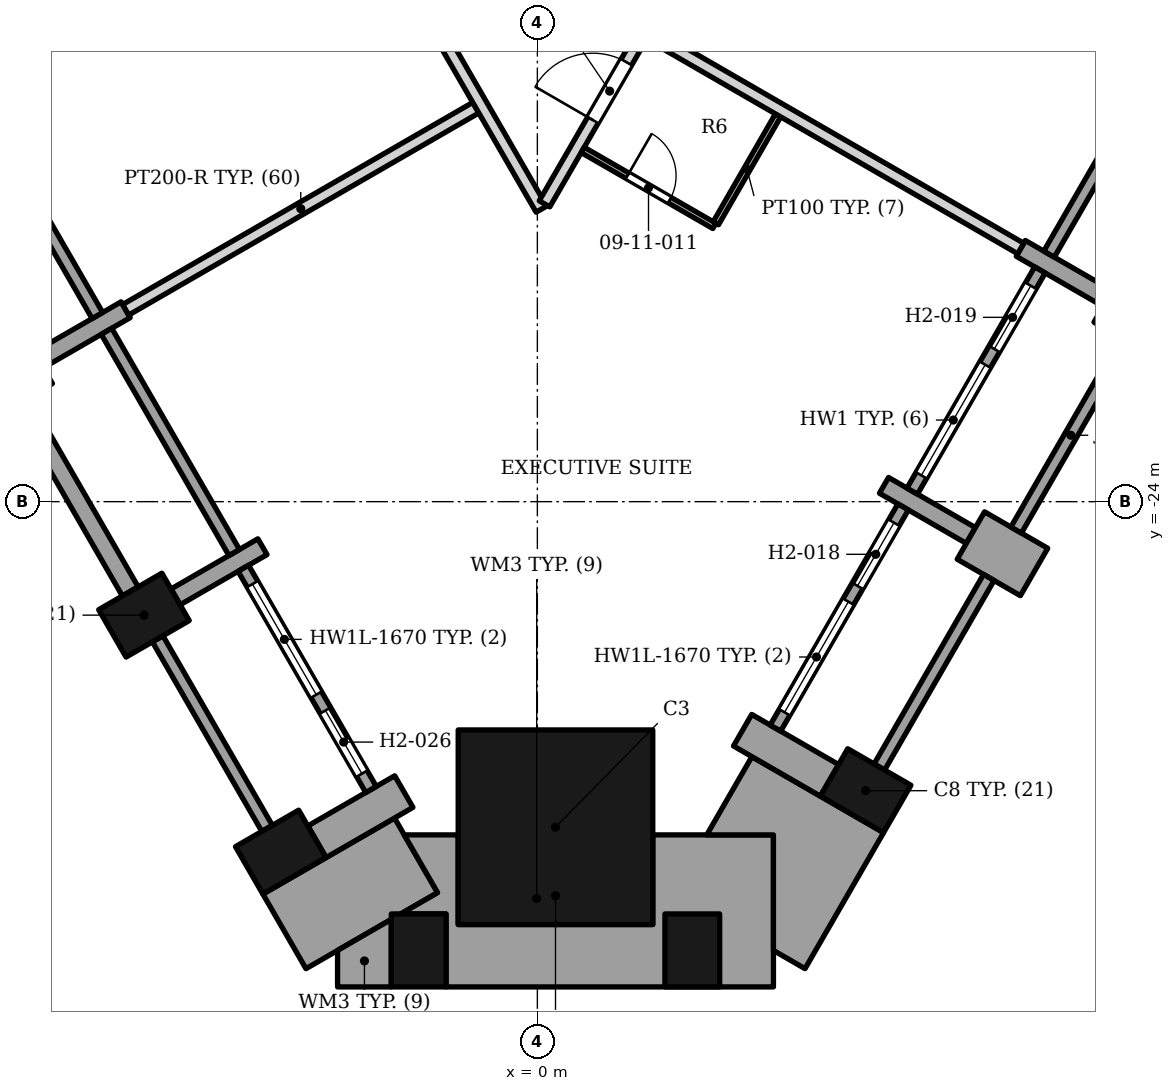
"""IFC4 building model, lengths in metres.
Left out: names, types, materials, properties, quantities, classifications, styles, units other than length and angle.
Written with IfcOpenShell. Run it as: python <this file> out.ifc"""

import sys

from ifc_helpers import new_model, si_unit, direction, frame, frame_2d, origin, origin_2d, place, context, subcontext, project, spatial, polyline, rectangle, outline, extrude, element, fill, save


model = new_model("IFC4")
c1 = context("Model", 3, precision=1e-05, world=origin(), true_north=direction((0.0, 1.0)))
c2 = subcontext(c1, "Body", "Model", "MODEL_VIEW")
j1 = project(units=[si_unit("LENGTHUNIT", "METRE"), si_unit("PLANEANGLEUNIT", "RADIAN")], contexts=[c1])
p1 = place(None, origin())
s1 = spatial("IfcSite", under=j1, at=p1, CompositionType="ELEMENT")
p2 = place(p1, origin())
s2 = spatial("IfcBuilding", under=s1, at=p2, CompositionType="ELEMENT")
p3 = place(p2, frame((0.0, 0.0, 56.2)))
s3 = spatial("IfcBuildingStorey", under=s2, at=p3, CompositionType="ELEMENT", Elevation=56.2)
p4 = place(p3, frame((0.298, -29.354, 0.0), z_axis=(0.0, 0.0, 1.0), x_axis=(0.0, 1.0, 0.0)))
e1 = element("IfcColumn", 1, at=p4, inside=s3, PredefinedType="COLUMN", context=c2, shape_type="SweptSolid", body=[
    extrude(rectangle(XDim=3.2, YDim=3.2, at=origin_2d()), origin(), (0.0, 0.0, 1.0), 3.4),
])
for number, where, z_axis, x_axis in (
    (2, (-6.47, -25.866, 0.0), (0.0, 0.0, 1.0), (0.5, -0.866, 0.0)),
    (3, (-4.22, -29.763, 0.0), (0.0, 0.0, 1.0), (0.5, -0.866, 0.0)),
    (4, (-1.952, -31.38, 0.0), (0.0, 0.0, 1.0), (1.0, 0.0, 0.0)),
    (5, (2.548, -31.38, 0.0), (0.0, 0.0, 1.0), (1.0, 0.0, 0.0)),
    (6, (5.399, -28.753, 0.0), (0.0, 0.0, 1.0), (0.5, 0.866, 0.0)),
    (7, (9.899, -20.959, 0.0), (0.0, 0.0, 1.0), (0.5, 0.866, 0.0)),
):
    element("IfcColumn", number, at=place(p3, frame(where, z_axis=z_axis, x_axis=x_axis)), inside=s3, PredefinedType="COLUMN", context=c2, shape_type="SweptSolid", body=[
        extrude(rectangle(XDim=0.9, YDim=1.2, at=origin_2d()), origin(), (0.0, 0.0, 1.0), 3.4),
    ])
p5 = place(p3, frame((-8.2, -21.669, 0.0), z_axis=(0.0, 0.0, 1.0), x_axis=(-0.865955154139, -0.50012165622, 0.0)))
e8 = element("IfcWall", 8, at=p5, inside=s3, PredefinedType="SOLIDWALL", context=c2, shape_type="SweptSolid", body=[
    extrude(rectangle(XDim=1.2, YDim=0.9, at=frame_2d((0.6, 0.0))), origin(), (0.0, 0.0, 1.0), 2.63),
])
p6 = place(p3, frame((-6.771, -20.844, 0.0), z_axis=(0.0, 0.0, 1.0), x_axis=(-0.866040211805, -0.499974350878, 0.0)))
e9 = element("IfcWall", 9, at=p6, inside=s3, PredefinedType="SOLIDWALL", context=c2, shape_type="SweptSolid", body=[
    extrude(rectangle(XDim=1.65, YDim=0.3, at=frame_2d((0.825, 0.0))), origin(), (0.0, 0.0, 1.0), 2.65),
])
p7 = place(p3, frame((-4.521, -24.741, 0.0), z_axis=(0.0, 0.0, 1.0), x_axis=(-0.865976140824, -0.500085316245, 0.0)))
e10 = element("IfcWall", 10, at=p7, inside=s3, PredefinedType="SOLIDWALL", context=c2, shape_type="SweptSolid", body=[
    extrude(rectangle(XDim=1.65, YDim=0.3, at=frame_2d((0.825, 0.0))), origin(), (0.0, 0.0, 1.0), 2.552),
])
p8 = place(p3, frame((-3.625, -29.593, 0.0), z_axis=(0.0, 0.0, 1.0), x_axis=(0.866040211805, 0.499974350878, 0.0)))
e11 = element("IfcWall", 11, at=p8, inside=s3, PredefinedType="SOLIDWALL", context=c2, shape_type="SweptSolid", body=[
    extrude(rectangle(XDim=1.65, YDim=0.6, at=frame_2d((0.825, 0.0))), origin(), (0.0, 0.0, 1.0), 2.63),
])
p9 = place(p3, frame((-9.336, -17.302, 0.0), z_axis=(0.0, 0.0, 1.0), x_axis=(0.500027713859, -0.866009402589, 0.0)))
e12 = element("IfcWall", 12, at=p9, inside=s3, PredefinedType="ELEMENTEDWALL", context=c2, shape_type="SweptSolid", body=[
    extrude(rectangle(XDim=4.2, YDim=0.2, at=frame_2d((2.1, 0.0))), origin(), (0.0, 0.0, 1.0), 2.65),
])
p10 = place(p3, frame((-8.495, -22.358, 0.0), z_axis=(0.0, 0.0, 1.0), x_axis=(0.499961193289, -0.866047807691, 0.0)))
e13 = element("IfcWall", 13, at=p10, inside=s3, PredefinedType="SOLIDWALL", context=c2, shape_type="SweptSolid", body=[
    extrude(rectangle(XDim=3.6, YDim=0.3, at=frame_2d((1.8, 0.0))), origin(), (0.0, 0.0, 1.0), 2.63),
])
p11 = place(p3, frame((-7.086, -21.199, 0.0), z_axis=(0.0, 0.0, 1.0), x_axis=(0.500027713859, -0.866009402589, 0.0)))
e14 = element("IfcWall", 14, at=p11, inside=s3, PredefinedType="ELEMENTEDWALL", context=c2, shape_type="SweptSolid", body=[
    extrude(rectangle(XDim=4.2, YDim=0.2, at=frame_2d((2.1, 0.0))), origin(), (0.0, 0.0, 1.0), 2.65),
])
p12 = place(p3, frame((-6.245, -26.256, 0.0), z_axis=(0.0, 0.0, 1.0), x_axis=(0.499961193289, -0.866047807691, 0.0)))
e15 = element("IfcWall", 15, at=p12, inside=s3, PredefinedType="SOLIDWALL", context=c2, shape_type="SweptSolid", body=[
    extrude(rectangle(XDim=3.6, YDim=0.2, at=frame_2d((1.8, 0.0))), origin(), (0.0, 0.0, 1.0), 2.63),
])
p13 = place(p3, frame((-4.836, -25.096, 0.0), z_axis=(0.0, 0.0, 1.0), x_axis=(0.500002543286, -0.866023935413, 0.0)))
e16 = element("IfcWall", 16, at=p13, inside=s3, PredefinedType="ELEMENTEDWALL", context=c2, shape_type="SweptSolid", body=[
    extrude(rectangle(XDim=4.2, YDim=0.2, at=frame_2d((2.1, 0.0))), origin(), (0.0, 0.0, 1.0), 2.374),
])
p14 = place(p13, frame((0.3, 0.0, 0.6)))
e17 = element("IfcOpeningElement", 17, at=p14, cuts=e16, PredefinedType="OPENING", context=c2, shape_type="SweptSolid", body=[
    extrude(rectangle(XDim=2.1, YDim=1.67, at=frame_2d((1.05, 0.835))), frame((0.0, 0.11, 0.0), z_axis=(0.0, -1.0, 0.0), x_axis=(1.0, 0.0, 0.0)), (0.0, 0.0, 1.0), 0.22),
])
p15 = place(p13, frame((2.7, 0.0, 0.0)))
e18 = element("IfcOpeningElement", 18, at=p15, cuts=e16, PredefinedType="OPENING", context=c2, shape_type="SweptSolid", body=[
    extrude(rectangle(XDim=1.2, YDim=2.27, at=frame_2d((0.6, 1.135))), frame((0.0, 0.11, 0.0), z_axis=(0.0, -1.0, 0.0), x_axis=(1.0, 0.0, 0.0)), (0.0, 0.0, 1.0), 0.22),
])
p16 = place(p3, frame((4.804, -28.583, 0.0), z_axis=(0.0, 0.0, 1.0), x_axis=(-0.865976140824, 0.500085316245, 0.0)))
e19 = element("IfcWall", 19, at=p16, inside=s3, PredefinedType="SOLIDWALL", context=c2, shape_type="SweptSolid", body=[
    extrude(rectangle(XDim=1.65, YDim=0.6, at=frame_2d((0.825, 0.0))), origin(), (0.0, 0.0, 1.0), 2.65),
])
p17 = place(p3, frame((8.169, -25.156, 0.0), z_axis=(0.0, 0.0, 1.0), x_axis=(-0.865955154139, 0.50012165622, 0.0)))
e20 = element("IfcWall", 20, at=p17, inside=s3, PredefinedType="SOLIDWALL", context=c2, shape_type="SweptSolid", body=[
    extrude(rectangle(XDim=1.2, YDim=0.9, at=frame_2d((0.6, 0.0))), origin(), (0.0, 0.0, 1.0), 2.63),
])
p18 = place(p3, frame((7.13, -24.556, 0.0), z_axis=(0.0, 0.0, 1.0), x_axis=(-0.866040211805, 0.499974350878, 0.0)))
e21 = element("IfcWall", 21, at=p18, inside=s3, PredefinedType="SOLIDWALL", context=c2, shape_type="SweptSolid", body=[
    extrude(rectangle(XDim=1.65, YDim=0.3, at=frame_2d((0.825, 0.0))), origin(), (0.0, 0.0, 1.0), 2.65),
])
p19 = place(p3, frame((9.379, -20.659, 0.0), z_axis=(0.0, 0.0, 1.0), x_axis=(-0.866003217194, 0.500038426333, 0.0)))
e22 = element("IfcWall", 22, at=p19, inside=s3, PredefinedType="SOLIDWALL", context=c2, shape_type="SweptSolid", body=[
    extrude(rectangle(XDim=1.65, YDim=0.3, at=frame_2d((0.825, 0.0))), origin(), (0.0, 0.0, 1.0), 2.65),
])
p20 = place(p3, frame((5.624, -28.364, 0.0), z_axis=(0.0, 0.0, 1.0), x_axis=(0.499961193289, 0.866047807691, 0.0)))
e23 = element("IfcWall", 23, at=p20, inside=s3, PredefinedType="SOLIDWALL", context=c2, shape_type="SweptSolid", body=[
    extrude(rectangle(XDim=3.6, YDim=0.2, at=frame_2d((1.8, 0.0))), origin(), (0.0, 0.0, 1.0), 2.374),
])
p21 = place(p3, frame((3.915, -27.724, 0.0), z_axis=(0.0, 0.0, 1.0), x_axis=(0.500002543286, 0.866023935413, 0.0)))
e24 = element("IfcWall", 24, at=p21, inside=s3, PredefinedType="ELEMENTEDWALL", context=c2, shape_type="SweptSolid", body=[
    extrude(rectangle(XDim=4.2, YDim=0.2, at=frame_2d((2.1, 0.0))), origin(), (0.0, 0.0, 1.0), 2.374),
])
p22 = place(p21, frame((0.3, 0.0, 0.6)))
e25 = element("IfcOpeningElement", 25, at=p22, cuts=e24, PredefinedType="OPENING", context=c2, shape_type="SweptSolid", body=[
    extrude(rectangle(XDim=2.1, YDim=1.67, at=frame_2d((1.05, 0.835))), frame((0.0, 0.11, 0.0), z_axis=(0.0, -1.0, 0.0), x_axis=(1.0, 0.0, 0.0)), (0.0, 0.0, 1.0), 0.22),
])
p23 = place(p21, frame((2.7, 0.0, 0.0)))
e26 = element("IfcOpeningElement", 26, at=p23, cuts=e24, PredefinedType="OPENING", context=c2, shape_type="SweptSolid", body=[
    extrude(rectangle(XDim=1.2, YDim=2.27, at=frame_2d((0.6, 1.135))), frame((0.0, 0.11, 0.0), z_axis=(0.0, -1.0, 0.0), x_axis=(1.0, 0.0, 0.0)), (0.0, 0.0, 1.0), 0.22),
])
p24 = place(p3, frame((7.874, -24.467, 0.0), z_axis=(0.0, 0.0, 1.0), x_axis=(0.499961193289, 0.866047807691, 0.0)))
e27 = element("IfcWall", 27, at=p24, inside=s3, PredefinedType="SOLIDWALL", context=c2, shape_type="SweptSolid", body=[
    extrude(rectangle(XDim=3.6, YDim=0.2, at=frame_2d((1.8, 0.0))), origin(), (0.0, 0.0, 1.0), 2.63),
])
p25 = place(p3, frame((6.165, -23.826, 0.0), z_axis=(0.0, 0.0, 1.0), x_axis=(0.500027713859, 0.866009402589, 0.0)))
e28 = element("IfcWall", 28, at=p25, inside=s3, PredefinedType="ELEMENTEDWALL", context=c2, shape_type="SweptSolid", body=[
    extrude(rectangle(XDim=4.2, YDim=0.2, at=frame_2d((2.1, 0.0))), origin(), (0.0, 0.0, 1.0), 2.65),
])
p26 = place(p25, frame((0.3, 0.0, 0.6)))
e29 = element("IfcOpeningElement", 29, at=p26, cuts=e28, PredefinedType="OPENING", context=c2, shape_type="SweptSolid", body=[
    extrude(rectangle(XDim=2.1, YDim=1.8, at=frame_2d((1.05, 0.9))), frame((0.0, 0.11, 0.0), z_axis=(0.0, -1.0, 0.0), x_axis=(1.0, 0.0, 0.0)), (0.0, 0.0, 1.0), 0.22),
])
p27 = place(p25, frame((2.7, 0.0, 0.0)))
e30 = element("IfcOpeningElement", 30, at=p27, cuts=e28, PredefinedType="OPENING", context=c2, shape_type="SweptSolid", body=[
    extrude(rectangle(XDim=1.2, YDim=2.4, at=frame_2d((0.6, 1.2))), frame((0.0, 0.11, 0.0), z_axis=(0.0, -1.0, 0.0), x_axis=(1.0, 0.0, 0.0)), (0.0, 0.0, 1.0), 0.22),
])
p28 = place(p3, frame((8.415, -19.929, 0.0), z_axis=(0.0, 0.0, 1.0), x_axis=(0.500002543286, 0.866023935413, 0.0)))
e31 = element("IfcWall", 31, at=p28, inside=s3, PredefinedType="ELEMENTEDWALL", context=c2, shape_type="SweptSolid", body=[
    extrude(rectangle(XDim=4.2, YDim=0.2, at=frame_2d((2.1, 0.0))), origin(), (0.0, 0.0, 1.0), 2.65),
])
p29 = place(p3, frame((-1.995, -29.816, 0.0), z_axis=(0.0, 0.0, 1.0), x_axis=(-0.866022959057, -0.500004234368, 0.0)))
e32 = element("IfcWall", 32, at=p29, inside=s3, PredefinedType="SOLIDWALL", context=c2, shape_type="SweptSolid", body=[
    extrude(rectangle(XDim=2.5, YDim=1.417, at=frame_2d((1.25, 0.0))), origin(), (0.0, 0.0, 1.0), 2.63),
])
p30 = place(p3, origin())
e33 = element("IfcWall", 33, at=p30, inside=s3, PredefinedType="SOLIDWALL", context=c2, shape_type="SweptSolid", body=[
    extrude(outline(polyline([(-3.286, -31.38), (-3.286, -31.98), (-2.402, -31.98), (-2.402, -30.87), (-3.286, -31.38)])), origin(), (0.0, 0.0, 1.0), 2.63),
])
p31 = place(p3, origin())
e34 = element("IfcWall", 34, at=p31, inside=s3, PredefinedType="SOLIDWALL", context=c2, shape_type="SweptSolid", body=[
    extrude(outline(polyline([(-1.502, -30.78), (-1.502, -31.98), (3.883, -31.98), (3.883, -29.48), (1.898, -29.48), (1.898, -30.954), (-1.302, -30.954), (-1.302, -29.48), (-2.189, -29.48), (-1.641, -30.43), (-2.247, -30.78), (-1.502, -30.78)])), origin(), (0.0, 0.0, 1.0), 2.63),
])
p32 = place(p3, origin())
e35 = element("IfcWall", 35, at=p32, inside=s3, PredefinedType="SOLIDWALL", context=c2, shape_type="SweptSolid", body=[
    extrude(outline(polyline([(5.694, -29.443), (3.529, -28.193), (2.786, -29.48), (3.883, -29.48), (3.883, -31.38), (4.402, -31.68), (5.694, -29.443)])), origin(), (0.0, 0.0, 1.0), 2.63),
])
p33 = place(p3, frame((-6.771, -20.844, 0.0), z_axis=(0.0, 0.0, 1.0), x_axis=(0.866140962391, 0.499799793185, 0.0)))
e36 = element("IfcWall", 36, at=p33, inside=s3, PredefinedType="PARTITIONING", context=c2, shape_type="SweptSolid", body=[
    extrude(rectangle(XDim=6.65, YDim=0.2, at=frame_2d((3.325, 0.0))), origin(), (0.0, 0.0, 1.0), 2.552),
])
p34 = place(p3, frame((2.935, -19.422, 0.0), z_axis=(0.0, 0.0, 1.0), x_axis=(0.499354689006, 0.866397653833, 0.0)))
e37 = element("IfcWall", 37, at=p34, inside=s3, PredefinedType="PARTITIONING", context=c2, shape_type="SweptSolid", body=[
    extrude(rectangle(XDim=2.05, YDim=0.1, at=frame_2d((1.025, 0.0))), origin(), (0.0, 0.0, 1.0), 3.23),
])
p35 = place(p3, frame((-11.227, 0.37, 0.0), z_axis=(0.0, 0.0, 1.0), x_axis=(0.500006900114, -0.866021419965, 0.0)))
e38 = element("IfcWall", 38, at=p35, inside=s3, PredefinedType="PARTITIONING", context=c2, shape_type="SweptSolid", body=[
    extrude(rectangle(XDim=22.586, YDim=0.2, at=frame_2d((11.293, 0.0))), origin(), (0.0, 0.0, 1.0), 2.374),
])
p36 = place(p35, frame((10.8, 0.0, 0.0)))
e39 = element("IfcOpeningElement", 39, at=p36, cuts=e38, PredefinedType="OPENING", context=c2, shape_type="SweptSolid", body=[
    extrude(rectangle(XDim=1.6, YDim=2.1, at=frame_2d((0.8, 1.05))), frame((0.0, 0.11, 0.0), z_axis=(0.0, -1.0, 0.0), x_axis=(1.0, 0.0, 0.0)), (0.0, 0.0, 1.0), 0.22),
])
p37 = place(p3, frame((0.118, -19.102, 0.0), z_axis=(0.0, 0.0, 1.0), x_axis=(0.500402764758, 0.865792742533, 0.0)))
e40 = element("IfcWall", 40, at=p37, inside=s3, PredefinedType="PARTITIONING", context=c2, shape_type="SweptSolid", body=[
    extrude(rectangle(XDim=3.282, YDim=0.2, at=frame_2d((1.641, 0.0))), origin(), (0.0, 0.0, 1.0), 2.628),
])
p38 = place(p37, frame((1.591, 0.0, 0.0)))
e41 = element("IfcOpeningElement", 41, at=p38, cuts=e40, PredefinedType="OPENING", context=c2, shape_type="SweptSolid", body=[
    extrude(rectangle(XDim=1.1, YDim=2.1, at=frame_2d((0.55, 1.05))), frame((0.0, 0.11, 0.0), z_axis=(0.0, -1.0, 0.0), x_axis=(1.0, 0.0, 0.0)), (0.0, 0.0, 1.0), 0.22),
])
p39 = place(p3, frame((0.745, -18.215, 0.0), z_axis=(0.0, 0.0, 1.0), x_axis=(0.866022959057, -0.500004234368, 0.0)))
e42 = element("IfcWall", 42, at=p39, inside=s3, PredefinedType="PARTITIONING", context=c2, shape_type="SweptSolid", body=[
    extrude(rectangle(XDim=2.5, YDim=0.1, at=frame_2d((1.25, 0.0))), origin(), (0.0, 0.0, 1.0), 3.23),
])
p40 = place(p39, frame((0.85, 0.0, 0.0)))
e43 = element("IfcOpeningElement", 43, at=p40, cuts=e42, PredefinedType="OPENING", context=c2, shape_type="SweptSolid", body=[
    extrude(rectangle(XDim=0.8, YDim=2.1, at=frame_2d((0.4, 1.05))), frame((0.0, 0.06, 0.0), z_axis=(0.0, -1.0, 0.0), x_axis=(1.0, 0.0, 0.0)), (0.0, 0.0, 1.0), 0.12),
])
p41 = place(p3, frame((1.844, -16.311, 0.0), z_axis=(0.0, 0.0, 1.0), x_axis=(0.866037373075, -0.499979268008, 0.0)))
e44 = element("IfcWall", 44, at=p41, inside=s3, PredefinedType="PARTITIONING", context=c2, shape_type="SweptSolid", body=[
    extrude(rectangle(XDim=7.05, YDim=0.2, at=frame_2d((3.525, 0.0))), origin(), (0.0, 0.0, 1.0), 2.552),
])
p42 = place(p14, origin())
e45 = element("IfcWindow", 45, at=p42, inside=s3, PartitioningType="SINGLE_PANEL", PredefinedType="WINDOW", context=c2, shape_type="SweptSolid", body=[
    extrude(rectangle(XDim=2.1, YDim=1.67, at=frame_2d((1.05, 0.835))), frame((0.0, 0.03, 0.0), z_axis=(0.0, -1.0, 0.0), x_axis=(1.0, 0.0, 0.0)), (0.0, 0.0, 1.0), 0.06),
])
fill(e17, e45)
p43 = place(p15, origin())
e46 = element("IfcDoor", 46, at=p43, inside=s3, OperationType="SINGLE_SWING_LEFT", PredefinedType="DOOR", context=c2, shape_type="SweptSolid", body=[
    extrude(rectangle(XDim=1.2, YDim=2.27, at=frame_2d((0.6, 1.135))), frame((0.0, 0.025, 0.0), z_axis=(0.0, -1.0, 0.0), x_axis=(1.0, 0.0, 0.0)), (0.0, 0.0, 1.0), 0.05),
])
fill(e18, e46)
p44 = place(p22, origin())
e47 = element("IfcWindow", 47, at=p44, inside=s3, PartitioningType="SINGLE_PANEL", PredefinedType="WINDOW", context=c2, shape_type="SweptSolid", body=[
    extrude(rectangle(XDim=2.1, YDim=1.67, at=frame_2d((1.05, 0.835))), frame((0.0, 0.03, 0.0), z_axis=(0.0, -1.0, 0.0), x_axis=(1.0, 0.0, 0.0)), (0.0, 0.0, 1.0), 0.06),
])
fill(e25, e47)
p45 = place(p23, origin())
e48 = element("IfcDoor", 48, at=p45, inside=s3, OperationType="SINGLE_SWING_LEFT", PredefinedType="DOOR", context=c2, shape_type="SweptSolid", body=[
    extrude(rectangle(XDim=1.2, YDim=2.27, at=frame_2d((0.6, 1.135))), frame((0.0, 0.025, 0.0), z_axis=(0.0, -1.0, 0.0), x_axis=(1.0, 0.0, 0.0)), (0.0, 0.0, 1.0), 0.05),
])
fill(e26, e48)
p46 = place(p26, origin())
e49 = element("IfcWindow", 49, at=p46, inside=s3, PartitioningType="SINGLE_PANEL", PredefinedType="WINDOW", context=c2, shape_type="SweptSolid", body=[
    extrude(rectangle(XDim=2.1, YDim=1.8, at=frame_2d((1.05, 0.9))), frame((0.0, 0.03, 0.0), z_axis=(0.0, -1.0, 0.0), x_axis=(1.0, 0.0, 0.0)), (0.0, 0.0, 1.0), 0.06),
])
fill(e29, e49)
p47 = place(p27, origin())
e50 = element("IfcDoor", 50, at=p47, inside=s3, OperationType="SINGLE_SWING_LEFT", PredefinedType="DOOR", context=c2, shape_type="SweptSolid", body=[
    extrude(rectangle(XDim=1.2, YDim=2.4, at=frame_2d((0.6, 1.2))), frame((0.0, 0.025, 0.0), z_axis=(0.0, -1.0, 0.0), x_axis=(1.0, 0.0, 0.0)), (0.0, 0.0, 1.0), 0.05),
])
fill(e30, e50)
p48 = place(p40, origin())
e51 = element("IfcDoor", 51, at=p48, inside=s3, OperationType="SINGLE_SWING_LEFT", PredefinedType="DOOR", context=c2, shape_type="SweptSolid", body=[
    extrude(rectangle(XDim=0.8, YDim=2.1, at=frame_2d((0.4, 1.05))), frame((0.0, 0.025, 0.0), z_axis=(0.0, -1.0, 0.0), x_axis=(1.0, 0.0, 0.0)), (0.0, 0.0, 1.0), 0.05),
])
fill(e43, e51)
p49 = place(p38, origin())
e52 = element("IfcDoor", 52, at=p49, inside=s3, OperationType="SINGLE_SWING_LEFT", PredefinedType="DOOR", context=c2, shape_type="SweptSolid", body=[
    extrude(rectangle(XDim=1.1, YDim=2.1, at=frame_2d((0.55, 1.05))), frame((0.0, 0.025, 0.0), z_axis=(0.0, -1.0, 0.0), x_axis=(1.0, 0.0, 0.0)), (0.0, 0.0, 1.0), 0.05),
])
fill(e41, e52)
save(model, sys.argv[1])
